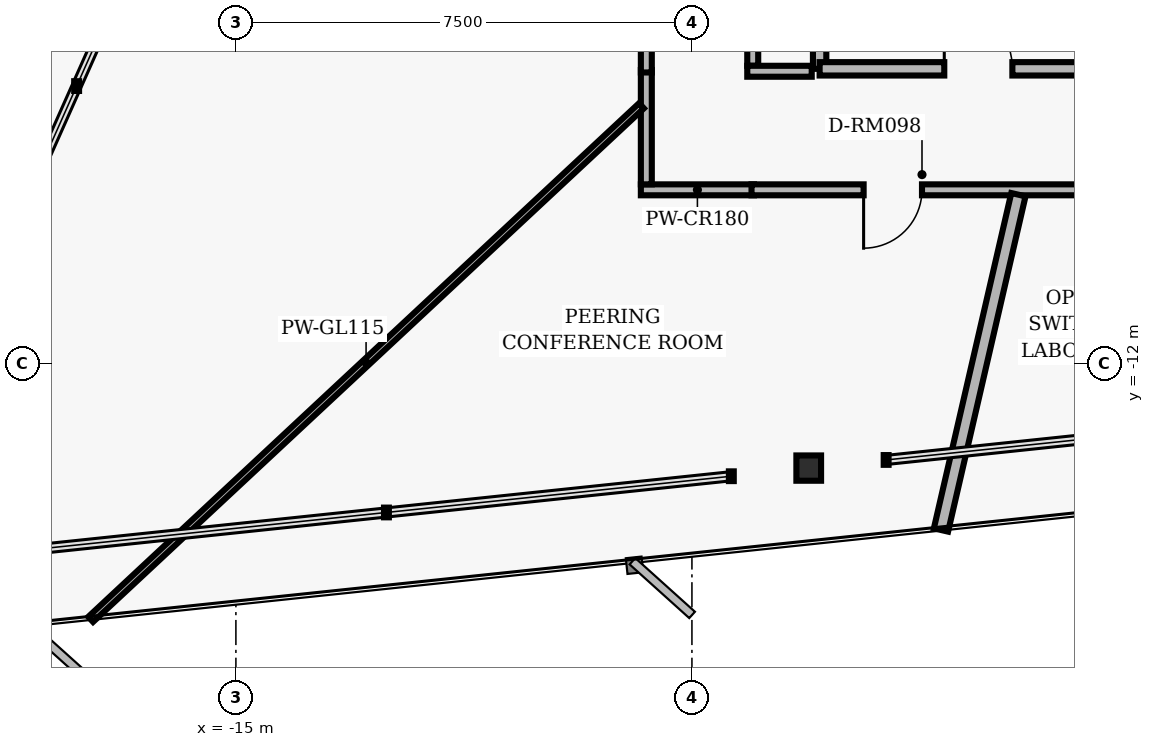
"""IFC4 building model, lengths in metres.
Left out: names, types, materials, properties, quantities, classifications, styles, units other than length and angle.
Written with IfcOpenShell. Run it as: python <this file> out.ifc"""

import sys

from ifc_helpers import new_model, si_unit, direction, frame, frame_2d, origin, origin_2d, place, context, subcontext, project, spatial, rectangle, i_section, extrude, element, fill, save


model = new_model("IFC4")
c1 = context("Model", 3, precision=1e-05, world=origin(), true_north=direction((0.0, 1.0)))
c2 = subcontext(c1, "Body", "Model", "MODEL_VIEW")
j1 = project(units=[si_unit("LENGTHUNIT", "METRE"), si_unit("PLANEANGLEUNIT", "RADIAN")], contexts=[c1])
p1 = place(None, origin())
s1 = spatial("IfcSite", under=j1, at=p1, CompositionType="ELEMENT")
p2 = place(p1, origin())
s2 = spatial("IfcBuilding", under=s1, at=p2, CompositionType="ELEMENT")
p3 = place(p2, frame((0.0, 0.0, 116.8)))
s3 = spatial("IfcBuildingStorey", under=s2, at=p3, CompositionType="ELEMENT", Elevation=116.8)
p4 = place(p3, frame((-5.579, -13.727, 0.0), z_axis=(0.0, 0.0, 1.0), x_axis=(1.0, 0.0, 0.0)))
e1 = element("IfcColumn", 1, at=p4, inside=s3, PredefinedType="COLUMN", context=c2, shape_type="SweptSolid", body=[
    extrude(i_section(OverallWidth=0.406, OverallDepth=0.416, WebThickness=0.03, FlangeThickness=0.048, FilletRadius=0.02, at=origin_2d()), origin(), (0.0, 0.0, 1.0), 3.04),
])
p5 = place(p3, frame((-5.4, -7.16, 0.0), z_axis=(0.0, 0.0, 1.0), x_axis=(0.0, 1.0, 0.0)))
e2 = element("IfcWall", 2, at=p5, inside=s3, PredefinedType="PARTITIONING", context=c2, shape_type="SweptSolid", body=[
    extrude(rectangle(XDim=2.71, YDim=0.22, at=frame_2d((1.355, 0.0))), origin(), (0.0, 0.0, 1.0), 2.763),
])
p6 = place(p3, frame((-5.4, -7.16, 0.0), z_axis=(0.0, 0.0, 1.0), x_axis=(1.0, 0.0, 0.0)))
e3 = element("IfcWall", 3, at=p6, inside=s3, PredefinedType="PARTITIONING", context=c2, shape_type="SweptSolid", body=[
    extrude(rectangle(XDim=5.4, YDim=0.22, at=frame_2d((2.7, 0.0))), origin(), (0.0, 0.0, 1.0), 2.33),
])
p7 = place(p6, frame((2.05, 0.0, 0.0)))
e4 = element("IfcOpeningElement", 4, at=p7, cuts=e3, PredefinedType="OPENING", context=c2, shape_type="SweptSolid", body=[
    extrude(rectangle(XDim=1.12, YDim=2.02, at=frame_2d((0.56, 1.01))), frame((0.0, 0.12, 0.0), z_axis=(0.0, -1.0, 0.0), x_axis=(1.0, 0.0, 0.0)), (0.0, 0.0, 1.0), 0.24),
])
p8 = place(p3, frame((-6.48, -9.15, 0.0), z_axis=(0.0, 0.0, 1.0), x_axis=(-1.0, 0.0, 0.0)))
e5 = element("IfcWall", 5, at=p8, inside=s3, PredefinedType="PARTITIONING", context=c2, shape_type="SweptSolid", body=[
    extrude(rectangle(XDim=1.86, YDim=0.18, at=frame_2d((0.93, 0.0))), origin(), (0.0, 0.0, 1.0), 2.33),
])
p9 = place(p3, frame((-8.25, -9.06, 0.0), z_axis=(0.0, 0.0, 1.0), x_axis=(0.0, 1.0, 0.0)))
e6 = element("IfcWall", 6, at=p9, inside=s3, PredefinedType="PARTITIONING", context=c2, shape_type="SweptSolid", body=[
    extrude(rectangle(XDim=1.88, YDim=0.18, at=frame_2d((0.94, 0.0))), origin(), (0.0, 0.0, 1.0), 2.763),
])
p10 = place(p3, frame((-8.25, -7.22, 0.0), z_axis=(0.0, 0.0, 1.0), x_axis=(0.0, 1.0, 0.0)))
e7 = element("IfcWall", 7, at=p10, inside=s3, PredefinedType="PARTITIONING", context=c2, shape_type="SweptSolid", body=[
    extrude(rectangle(XDim=14.44, YDim=0.18, at=frame_2d((7.22, 0.0))), origin(), (0.0, 0.0, 1.0), 2.33),
])
p11 = place(p10, frame((6.665, 0.0, 0.0)))
e8 = element("IfcOpeningElement", 8, at=p11, cuts=e7, PredefinedType="OPENING", context=c2, shape_type="SweptSolid", body=[
    extrude(rectangle(XDim=0.96, YDim=2.02, at=frame_2d((0.48, 1.01))), frame((0.0, 0.1, 0.0), z_axis=(0.0, -1.0, 0.0), x_axis=(1.0, 0.0, 0.0)), (0.0, 0.0, 1.0), 0.2),
])
p12 = place(p10, frame((2.525, 0.0, 0.0)))
e9 = element("IfcOpeningElement", 9, at=p12, cuts=e7, PredefinedType="OPENING", context=c2, shape_type="SweptSolid", body=[
    extrude(rectangle(XDim=0.96, YDim=2.02, at=frame_2d((0.48, 1.01))), frame((0.0, 0.1, 0.0), z_axis=(0.0, -1.0, 0.0), x_axis=(1.0, 0.0, 0.0)), (0.0, 0.0, 1.0), 0.2),
])
p13 = place(p10, frame((10.88, 0.0, 0.0)))
e10 = element("IfcOpeningElement", 10, at=p13, cuts=e7, PredefinedType="OPENING", context=c2, shape_type="SweptSolid", body=[
    extrude(rectangle(XDim=0.96, YDim=2.02, at=frame_2d((0.48, 1.01))), frame((0.0, 0.1, 0.0), z_axis=(0.0, -1.0, 0.0), x_axis=(1.0, 0.0, 0.0)), (0.0, 0.0, 1.0), 0.2),
])
p14 = place(p3, frame((10.98, -9.15, 0.0), z_axis=(0.0, 0.0, 1.0), x_axis=(-1.0, 0.0, 0.0)))
e11 = element("IfcWall", 11, at=p14, inside=s3, PredefinedType="PARTITIONING", context=c2, shape_type="SweptSolid", body=[
    extrude(rectangle(XDim=17.5, YDim=0.18, at=frame_2d((8.75, 0.0))), origin(), (0.0, 0.0, 1.0), 2.33),
])
p15 = place(p14, frame((14.696, 0.0, 0.0)))
e12 = element("IfcOpeningElement", 12, at=p15, cuts=e11, PredefinedType="OPENING", context=c2, shape_type="SweptSolid", body=[
    extrude(rectangle(XDim=0.96, YDim=2.02, at=frame_2d((0.48, 1.01))), frame((0.0, 0.1, 0.0), z_axis=(0.0, -1.0, 0.0), x_axis=(1.0, 0.0, 0.0)), (0.0, 0.0, 1.0), 0.2),
])
p16 = place(p14, frame((9.764, 0.0, 0.0)))
e13 = element("IfcOpeningElement", 13, at=p16, cuts=e11, PredefinedType="OPENING", context=c2, shape_type="SweptSolid", body=[
    extrude(rectangle(XDim=1.02, YDim=2.02, at=frame_2d((0.51, 1.01))), frame((0.0, 0.1, 0.0), z_axis=(0.0, -1.0, 0.0), x_axis=(1.0, 0.0, 0.0)), (0.0, 0.0, 1.0), 0.2),
])
p17 = place(p14, frame((3.366, 0.0, 0.0)))
e14 = element("IfcOpeningElement", 14, at=p17, cuts=e11, PredefinedType="OPENING", context=c2, shape_type="SweptSolid", body=[
    extrude(rectangle(XDim=0.96, YDim=2.02, at=frame_2d((0.48, 1.01))), frame((0.0, 0.1, 0.0), z_axis=(0.0, -1.0, 0.0), x_axis=(1.0, 0.0, 0.0)), (0.0, 0.0, 1.0), 0.2),
])
p18 = place(p3, frame((-6.5, -4.88, 0.0), z_axis=(0.0, 0.0, 1.0), x_axis=(0.0, -1.0, 0.0)))
e15 = element("IfcWall", 15, at=p18, inside=s3, PredefinedType="PARTITIONING", context=c2, shape_type="SweptSolid", body=[
    extrude(rectangle(XDim=2.23, YDim=0.18, at=frame_2d((1.115, 0.0))), origin(), (0.0, 0.0, 1.0), 2.763),
])
p19 = place(p3, frame((-6.59, -7.2, 0.0), z_axis=(0.0, 0.0, 1.0), x_axis=(1.0, 0.0, 0.0)))
e16 = element("IfcWall", 16, at=p19, inside=s3, PredefinedType="PARTITIONING", context=c2, shape_type="SweptSolid", body=[
    extrude(rectangle(XDim=1.06, YDim=0.18, at=frame_2d((0.53, 0.0))), origin(), (0.0, 0.0, 1.0), 2.33),
])
p20 = place(p3, frame((-8.33, -7.768, 0.0), z_axis=(0.0, 0.0, 1.0), x_axis=(-0.731355419522, -0.681996517833, 0.0)))
e17 = element("IfcWall", 17, at=p20, inside=s3, PredefinedType="MOVABLE", context=c2, shape_type="SweptSolid", body=[
    extrude(rectangle(XDim=12.385, YDim=0.115, at=frame_2d((6.193, 0.0))), origin(), (0.0, 0.0, 1.0), 2.763),
])
p21 = place(p3, frame((-2.131, -9.23, 0.0), z_axis=(0.0, 0.0, 1.0), x_axis=(-0.224947713915, -0.974370835978, 0.0)))
e18 = element("IfcWall", 18, at=p21, inside=s3, PredefinedType="PARTITIONING", context=c2, shape_type="SweptSolid", body=[
    extrude(rectangle(XDim=5.66, YDim=0.24, at=frame_2d((2.83, 0.0))), origin(), (0.0, 0.0, 1.0), 2.763),
])
p22 = place(p7, origin())
e19 = element("IfcDoor", 19, at=p22, inside=s3, OperationType="SINGLE_SWING_LEFT", PredefinedType="DOOR", context=c2, shape_type="SweptSolid", body=[
    extrude(rectangle(XDim=1.12, YDim=2.02, at=frame_2d((0.56, 1.01))), frame((0.0, 0.025, 0.0), z_axis=(0.0, -1.0, 0.0), x_axis=(1.0, 0.0, 0.0)), (0.0, 0.0, 1.0), 0.05),
])
fill(e4, e19)
p23 = place(p15, origin())
e20 = element("IfcDoor", 20, at=p23, inside=s3, OperationType="SINGLE_SWING_RIGHT", PredefinedType="DOOR", context=c2, shape_type="SweptSolid", body=[
    extrude(rectangle(XDim=0.96, YDim=2.02, at=frame_2d((0.48, 1.01))), frame((0.0, 0.025, 0.0), z_axis=(0.0, -1.0, 0.0), x_axis=(1.0, 0.0, 0.0)), (0.0, 0.0, 1.0), 0.05),
])
fill(e12, e20)
save(model, sys.argv[1])
